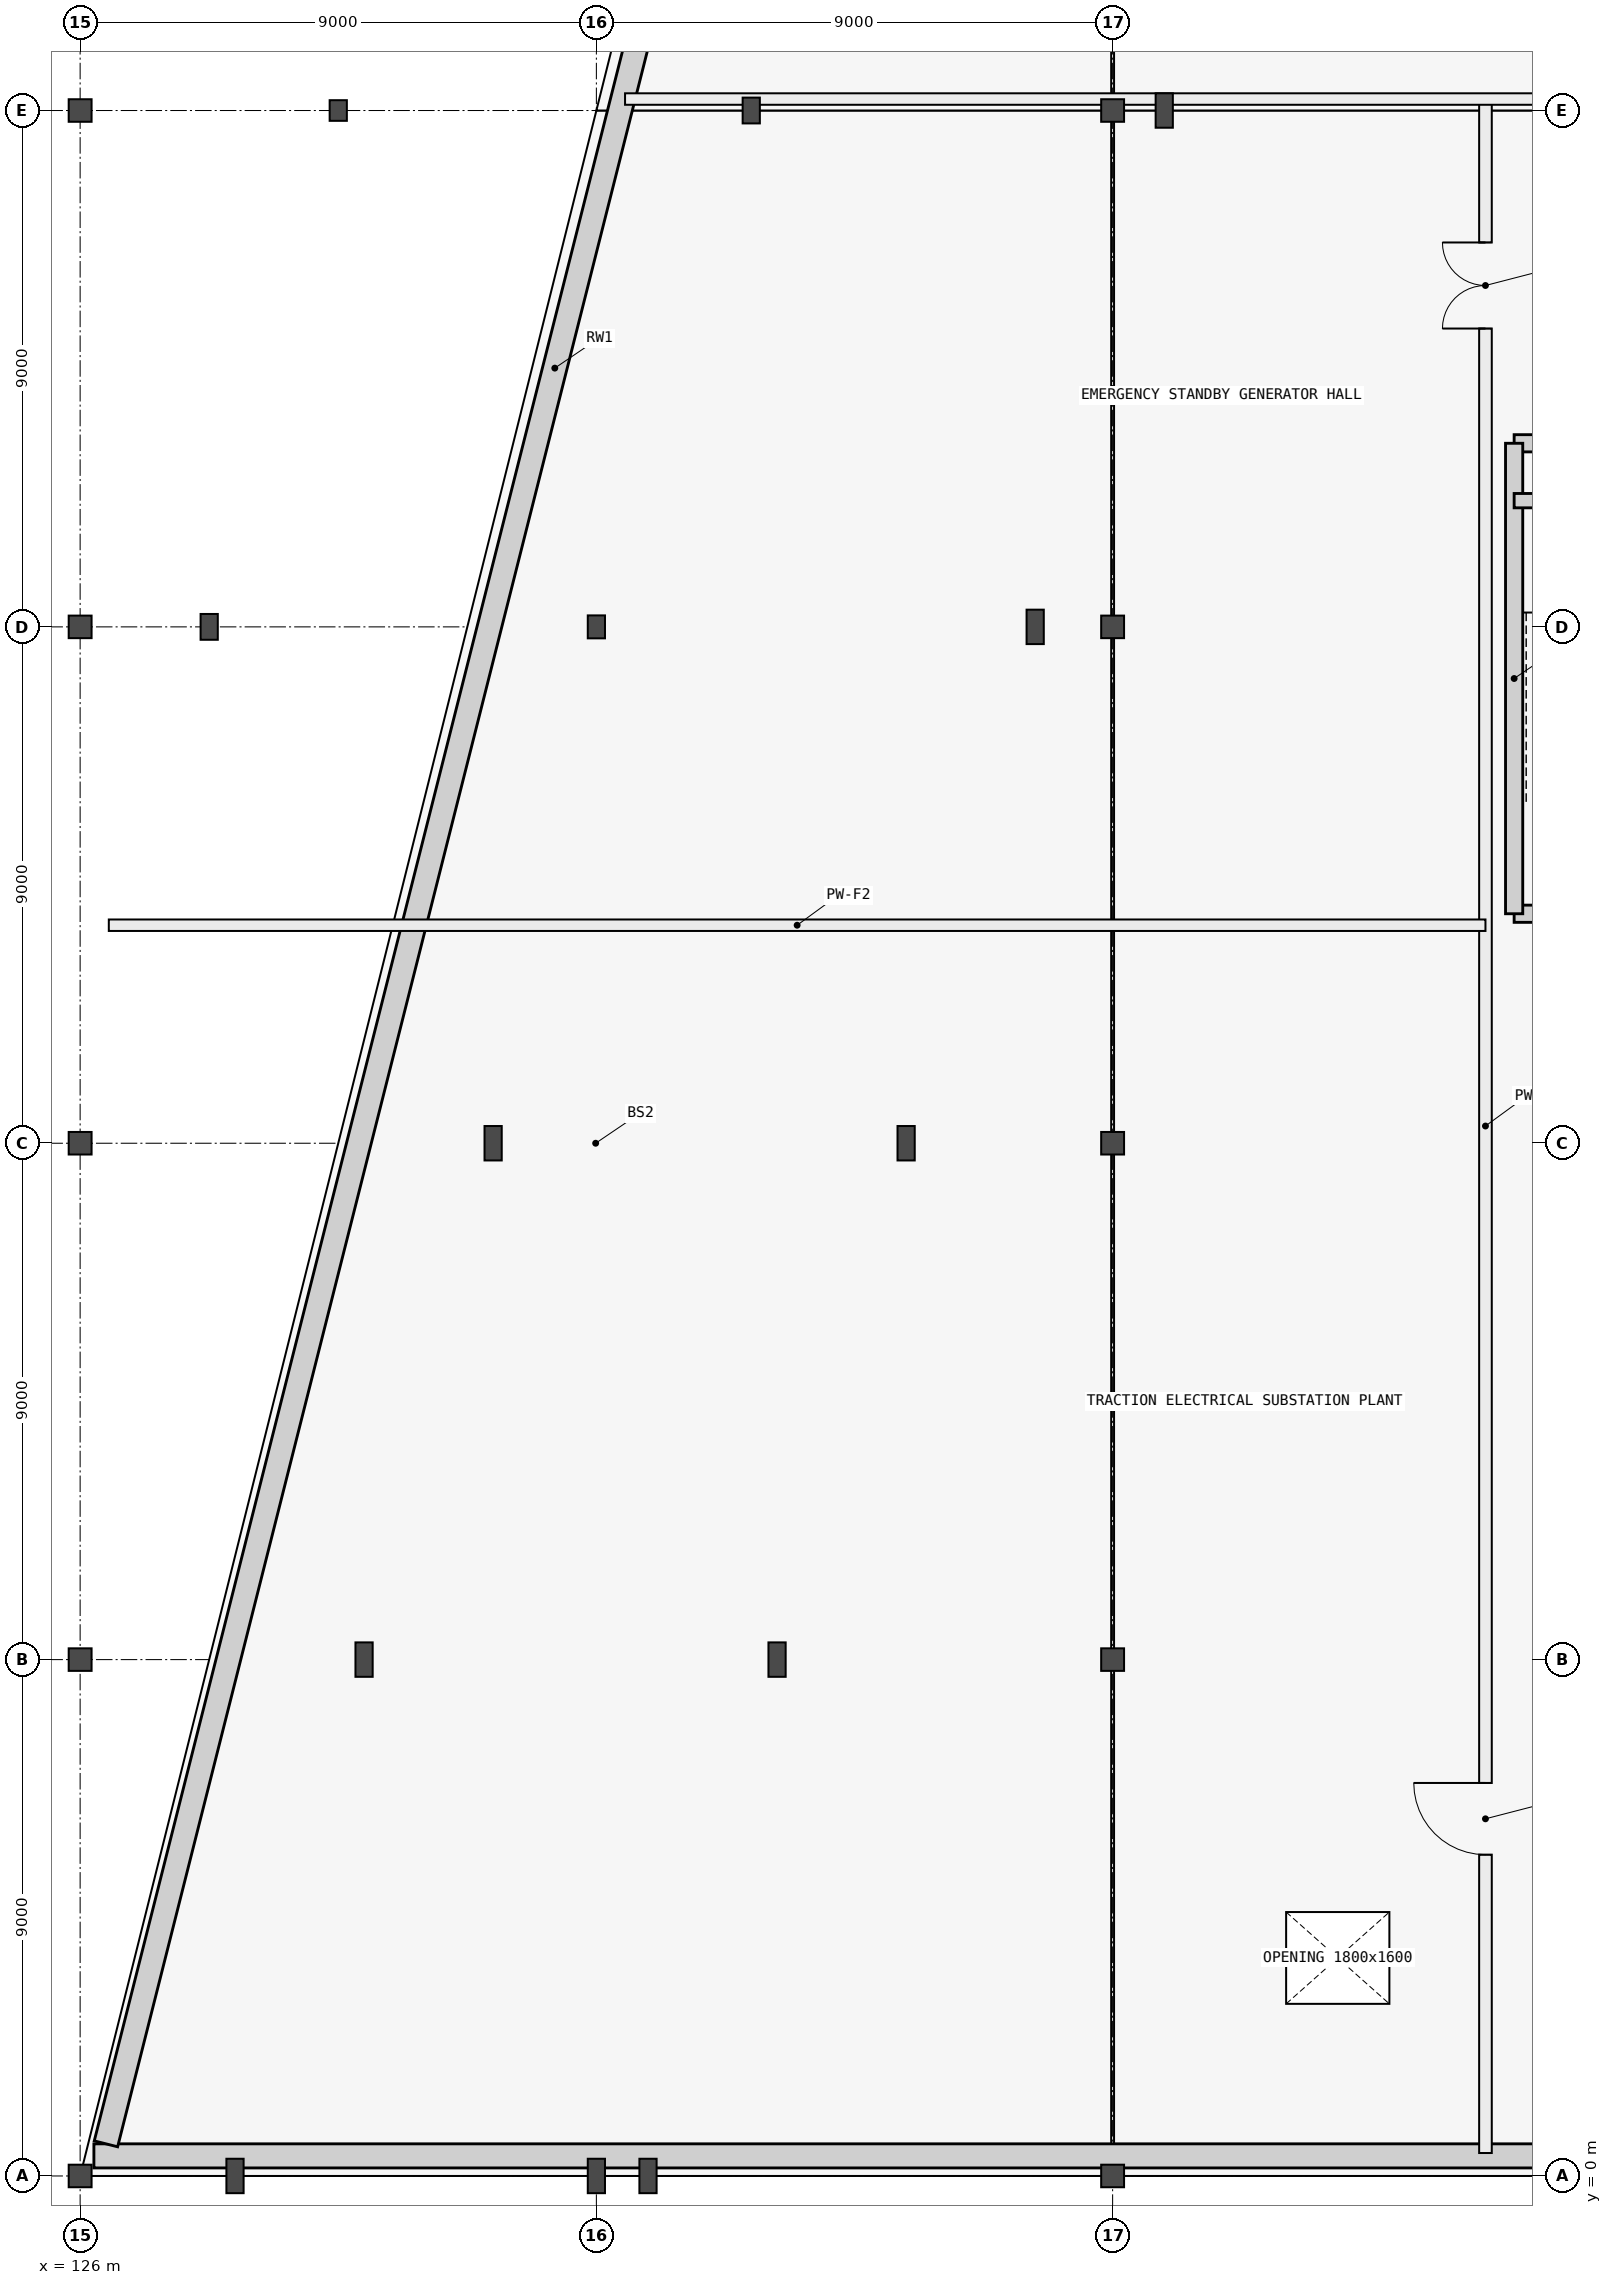
"""IFC4 building model, lengths in metres.
Left out: names, types, materials, properties, quantities, classifications, styles, units other than length and angle.
Written with IfcOpenShell. Run it as: python <this file> out.ifc"""

import sys

from ifc_helpers import new_model, si_unit, direction, frame, frame_2d, origin, origin_2d, place, context, subcontext, project, spatial, rectangle, i_section, extrude, element, fill, save


model = new_model("IFC4")
c1 = context("Model", 3, precision=1e-05, world=origin(), true_north=direction((0.0, 1.0)))
c2 = subcontext(c1, "Body", "Model", "MODEL_VIEW")
j1 = project(units=[si_unit("LENGTHUNIT", "METRE"), si_unit("PLANEANGLEUNIT", "RADIAN")], contexts=[c1])
p1 = place(None, origin())
s1 = spatial("IfcSite", under=j1, at=p1, CompositionType="ELEMENT")
p2 = place(p1, origin())
s2 = spatial("IfcBuilding", under=s1, at=p2, CompositionType="ELEMENT")
p3 = place(p2, frame((0.0, 0.0, -4.2)))
s3 = spatial("IfcBuildingStorey", under=s2, at=p3, CompositionType="ELEMENT", Elevation=-4.2)
p4 = place(p3, frame((126.0, 0.0, 0.0), z_axis=(0.0, 0.0, 1.0), x_axis=(1.0, 0.0, 0.0)))
e1 = element("IfcColumn", 1, at=p4, inside=s3, PredefinedType="COLUMN", context=c2, shape_type="SweptSolid", body=[
    extrude(i_section(OverallWidth=0.399, OverallDepth=0.393, WebThickness=0.018, FlangeThickness=0.028, FilletRadius=0.015, at=origin_2d()), origin(), (0.0, 0.0, 1.0), 4.2),
])
for number, where, z_axis, x_axis in (
    (2, (128.7, 0.0, 0.0), (0.0, 0.0, 1.0), (1.0, 0.0, 0.0)),
    (3, (135.0, 0.0, 0.0), (0.0, 0.0, 1.0), (1.0, 0.0, 0.0)),
    (4, (135.9, 0.0, 0.0), (0.0, 0.0, 1.0), (1.0, 0.0, 0.0)),
):
    element("IfcColumn", number, at=place(p3, frame(where, z_axis=z_axis, x_axis=x_axis)), inside=s3, PredefinedType="COLUMN", context=c2, shape_type="SweptSolid", body=[
        extrude(i_section(OverallWidth=0.3, OverallDepth=0.6, WebThickness=0.015, FlangeThickness=0.03, FilletRadius=0.027, at=origin_2d()), origin(), (0.0, 0.0, 1.0), 4.2),
    ])
for number, where, z_axis, x_axis in (
    (5, (144.0, 0.0, 0.0), (0.0, 0.0, 1.0), (1.0, 0.0, 0.0)),
    (6, (126.0, 9.0, 0.0), (0.0, 0.0, 1.0), (1.0, 0.0, 0.0)),
):
    element("IfcColumn", number, at=place(p3, frame(where, z_axis=z_axis, x_axis=x_axis)), inside=s3, PredefinedType="COLUMN", context=c2, shape_type="SweptSolid", body=[
        extrude(i_section(OverallWidth=0.399, OverallDepth=0.393, WebThickness=0.018, FlangeThickness=0.028, FilletRadius=0.015, at=origin_2d()), origin(), (0.0, 0.0, 1.0), 4.2),
    ])
for number, where, z_axis, x_axis in (
    (7, (130.95, 9.0, 0.0), (0.0, 0.0, 1.0), (1.0, 0.0, 0.0)),
    (8, (138.15, 9.0, 0.0), (0.0, 0.0, 1.0), (1.0, 0.0, 0.0)),
):
    element("IfcColumn", number, at=place(p3, frame(where, z_axis=z_axis, x_axis=x_axis)), inside=s3, PredefinedType="COLUMN", context=c2, shape_type="SweptSolid", body=[
        extrude(i_section(OverallWidth=0.3, OverallDepth=0.6, WebThickness=0.015, FlangeThickness=0.03, FilletRadius=0.027, at=origin_2d()), origin(), (0.0, 0.0, 1.0), 4.2),
    ])
for number, where, z_axis, x_axis in (
    (9, (144.0, 9.0, 0.0), (0.0, 0.0, 1.0), (1.0, 0.0, 0.0)),
    (10, (126.0, 18.0, 0.0), (0.0, 0.0, 1.0), (1.0, 0.0, 0.0)),
):
    element("IfcColumn", number, at=place(p3, frame(where, z_axis=z_axis, x_axis=x_axis)), inside=s3, PredefinedType="COLUMN", context=c2, shape_type="SweptSolid", body=[
        extrude(i_section(OverallWidth=0.399, OverallDepth=0.393, WebThickness=0.018, FlangeThickness=0.028, FilletRadius=0.015, at=origin_2d()), origin(), (0.0, 0.0, 1.0), 4.2),
    ])
for number, where, z_axis, x_axis in (
    (11, (133.2, 18.0, 0.0), (0.0, 0.0, 1.0), (1.0, 0.0, 0.0)),
    (12, (140.4, 18.0, 0.0), (0.0, 0.0, 1.0), (1.0, 0.0, 0.0)),
):
    element("IfcColumn", number, at=place(p3, frame(where, z_axis=z_axis, x_axis=x_axis)), inside=s3, PredefinedType="COLUMN", context=c2, shape_type="SweptSolid", body=[
        extrude(i_section(OverallWidth=0.3, OverallDepth=0.6, WebThickness=0.015, FlangeThickness=0.03, FilletRadius=0.027, at=origin_2d()), origin(), (0.0, 0.0, 1.0), 4.2),
    ])
for number, where, z_axis, x_axis in (
    (13, (144.0, 18.0, 0.0), (0.0, 0.0, 1.0), (1.0, 0.0, 0.0)),
    (14, (126.0, 27.0, 0.0), (0.0, 0.0, 1.0), (1.0, 0.0, 0.0)),
):
    element("IfcColumn", number, at=place(p3, frame(where, z_axis=z_axis, x_axis=x_axis)), inside=s3, PredefinedType="COLUMN", context=c2, shape_type="SweptSolid", body=[
        extrude(i_section(OverallWidth=0.399, OverallDepth=0.393, WebThickness=0.018, FlangeThickness=0.028, FilletRadius=0.015, at=origin_2d()), origin(), (0.0, 0.0, 1.0), 4.2),
    ])
p5 = place(p3, frame((128.25, 27.0, 0.0), z_axis=(0.0, 0.0, 1.0), x_axis=(1.0, 0.0, 0.0)))
e15 = element("IfcColumn", 15, at=p5, inside=s3, PredefinedType="COLUMN", context=c2, shape_type="SweptSolid", body=[
    extrude(i_section(OverallWidth=0.3, OverallDepth=0.45, WebThickness=0.014, FlangeThickness=0.026, FilletRadius=0.027, at=origin_2d()), origin(), (0.0, 0.0, 1.0), 4.2),
])
p6 = place(p3, frame((135.0, 27.0, 0.0), z_axis=(0.0, 0.0, 1.0), x_axis=(1.0, 0.0, 0.0)))
e16 = element("IfcColumn", 16, at=p6, inside=s3, PredefinedType="COLUMN", context=c2, shape_type="SweptSolid", body=[
    extrude(i_section(OverallWidth=0.3, OverallDepth=0.4, WebThickness=0.013, FlangeThickness=0.024, FilletRadius=0.027, at=origin_2d()), origin(), (0.0, 0.0, 1.0), 4.2),
])
p7 = place(p3, frame((142.65, 27.0, 0.0), z_axis=(0.0, 0.0, 1.0), x_axis=(1.0, 0.0, 0.0)))
e17 = element("IfcColumn", 17, at=p7, inside=s3, PredefinedType="COLUMN", context=c2, shape_type="SweptSolid", body=[
    extrude(i_section(OverallWidth=0.3, OverallDepth=0.6, WebThickness=0.015, FlangeThickness=0.03, FilletRadius=0.027, at=origin_2d()), origin(), (0.0, 0.0, 1.0), 4.2),
])
for number, where, z_axis, x_axis in (
    (18, (144.0, 27.0, 0.0), (0.0, 0.0, 1.0), (1.0, 0.0, 0.0)),
    (19, (126.0, 36.0, 0.0), (0.0, 0.0, 1.0), (1.0, 0.0, 0.0)),
):
    element("IfcColumn", number, at=place(p3, frame(where, z_axis=z_axis, x_axis=x_axis)), inside=s3, PredefinedType="COLUMN", context=c2, shape_type="SweptSolid", body=[
        extrude(i_section(OverallWidth=0.399, OverallDepth=0.393, WebThickness=0.018, FlangeThickness=0.028, FilletRadius=0.015, at=origin_2d()), origin(), (0.0, 0.0, 1.0), 4.2),
    ])
p8 = place(p3, frame((130.5, 36.0, 0.0), z_axis=(0.0, 0.0, 1.0), x_axis=(1.0, 0.0, 0.0)))
e20 = element("IfcColumn", 20, at=p8, inside=s3, PredefinedType="COLUMN", context=c2, shape_type="SweptSolid", body=[
    extrude(i_section(OverallWidth=0.3, OverallDepth=0.36, WebThickness=0.012, FlangeThickness=0.022, FilletRadius=0.027, at=origin_2d()), origin(), (0.0, 0.0, 1.0), 4.2),
])
p9 = place(p3, frame((137.7, 36.0, 0.0), z_axis=(0.0, 0.0, 1.0), x_axis=(1.0, 0.0, 0.0)))
e21 = element("IfcColumn", 21, at=p9, inside=s3, PredefinedType="COLUMN", context=c2, shape_type="SweptSolid", body=[
    extrude(i_section(OverallWidth=0.3, OverallDepth=0.45, WebThickness=0.014, FlangeThickness=0.026, FilletRadius=0.027, at=origin_2d()), origin(), (0.0, 0.0, 1.0), 4.2),
])
p10 = place(p3, frame((144.0, 36.0, 0.0), z_axis=(0.0, 0.0, 1.0), x_axis=(1.0, 0.0, 0.0)))
e22 = element("IfcColumn", 22, at=p10, inside=s3, PredefinedType="COLUMN", context=c2, shape_type="SweptSolid", body=[
    extrude(i_section(OverallWidth=0.399, OverallDepth=0.393, WebThickness=0.018, FlangeThickness=0.028, FilletRadius=0.015, at=origin_2d()), origin(), (0.0, 0.0, 1.0), 4.2),
])
p11 = place(p3, frame((144.9, 36.0, 0.0), z_axis=(0.0, 0.0, 1.0), x_axis=(1.0, 0.0, 0.0)))
e23 = element("IfcColumn", 23, at=p11, inside=s3, PredefinedType="COLUMN", context=c2, shape_type="SweptSolid", body=[
    extrude(i_section(OverallWidth=0.3, OverallDepth=0.6, WebThickness=0.015, FlangeThickness=0.03, FilletRadius=0.027, at=origin_2d()), origin(), (0.0, 0.0, 1.0), 4.2),
])
p12 = place(p3, frame((126.24, 0.35, 0.0), z_axis=(0.0, 0.0, 1.0), x_axis=(1.0, 0.0, 0.0)))
e24 = element("IfcWall", 24, at=p12, inside=s3, PredefinedType="USERDEFINED", context=c2, shape_type="SweptSolid", body=[
    extrude(rectangle(XDim=53.62, YDim=0.42, at=frame_2d((26.81, 0.0))), origin(), (0.0, 0.0, 1.0), 3.6),
])
p13 = place(p3, frame((126.45, 0.56, 0.0), z_axis=(0.0, 0.0, 1.0), x_axis=(0.245116954548, 0.96949351653, 0.0)))
e25 = element("IfcWall", 25, at=p13, inside=s3, PredefinedType="USERDEFINED", context=c2, shape_type="SweptSolid", body=[
    extrude(rectangle(XDim=63.848, YDim=0.42, at=frame_2d((31.924, 0.0))), origin(), (0.0, 0.0, 1.0), 3.6),
])
p14 = place(p3, frame((151.0, 22.0, 0.0), z_axis=(0.0, 0.0, 1.0), x_axis=(1.0, 0.0, 0.0)))
e26 = element("IfcWall", 26, at=p14, inside=s3, PredefinedType="SHEAR", context=c2, shape_type="SweptSolid", body=[
    extrude(rectangle(XDim=10.2, YDim=0.3, at=frame_2d((5.1, 0.0))), origin(), (0.0, 0.0, 1.0), 3.94),
])
p15 = place(p14, frame((4.75, 0.0, 0.0)))
e27 = element("IfcOpeningElement", 27, at=p15, cuts=e26, PredefinedType="OPENING", context=c2, shape_type="SweptSolid", body=[
    extrude(rectangle(XDim=1.2, YDim=2.15, at=frame_2d((0.6, 1.075))), frame((0.0, 0.16, 0.0), z_axis=(0.0, -1.0, 0.0), x_axis=(1.0, 0.0, 0.0)), (0.0, 0.0, 1.0), 0.32),
])
p16 = place(p3, frame((161.2, 30.2, 0.0), z_axis=(0.0, 0.0, 1.0), x_axis=(-1.0, 0.0, 0.0)))
e28 = element("IfcWall", 28, at=p16, inside=s3, PredefinedType="SHEAR", context=c2, shape_type="SweptSolid", body=[
    extrude(rectangle(XDim=10.2, YDim=0.3, at=frame_2d((5.1, 0.0))), origin(), (0.0, 0.0, 1.0), 3.94),
])
p17 = place(p3, frame((151.0, 30.2, 0.0), z_axis=(0.0, 0.0, 1.0), x_axis=(0.0, -1.0, 0.0)))
e29 = element("IfcWall", 29, at=p17, inside=s3, PredefinedType="SHEAR", context=c2, shape_type="SweptSolid", body=[
    extrude(rectangle(XDim=8.2, YDim=0.3, at=frame_2d((4.1, 0.0))), origin(), (0.0, 0.0, 1.0), 3.94),
])
p18 = place(p3, frame((151.0, 29.2, 0.0), z_axis=(0.0, 0.0, 1.0), x_axis=(1.0, 0.0, 0.0)))
e30 = element("IfcWall", 30, at=p18, inside=s3, PredefinedType="SHEAR", context=c2, shape_type="SweptSolid", body=[
    extrude(rectangle(XDim=4.36, YDim=0.25, at=frame_2d((2.18, 0.0))), origin(), (0.0, 0.0, 1.0), 3.94),
])
p19 = place(p3, frame((150.5, 0.4, 0.0), z_axis=(0.0, 0.0, 1.0), x_axis=(0.0, 1.0, 0.0)))
e31 = element("IfcWall", 31, at=p19, inside=s3, PredefinedType="PARTITIONING", context=c2, shape_type="SweptSolid", body=[
    extrude(rectangle(XDim=35.8, YDim=0.22, at=frame_2d((17.9, 0.0))), origin(), (0.0, 0.0, 1.0), 3.94),
])
p20 = place(p19, frame((5.2, 0.0, 0.0)))
e32 = element("IfcOpeningElement", 32, at=p20, cuts=e31, PredefinedType="OPENING", context=c2, shape_type="SweptSolid", body=[
    extrude(rectangle(XDim=1.25, YDim=2.2, at=frame_2d((0.625, 1.1))), frame((0.0, 0.12, 0.0), z_axis=(0.0, -1.0, 0.0), x_axis=(1.0, 0.0, 0.0)), (0.0, 0.0, 1.0), 0.24),
])
p21 = place(p19, frame((31.8, 0.0, 0.0)))
e33 = element("IfcOpeningElement", 33, at=p21, cuts=e31, PredefinedType="OPENING", context=c2, shape_type="SweptSolid", body=[
    extrude(rectangle(XDim=1.5, YDim=2.2, at=frame_2d((0.75, 1.1))), frame((0.0, 0.12, 0.0), z_axis=(0.0, -1.0, 0.0), x_axis=(1.0, 0.0, 0.0)), (0.0, 0.0, 1.0), 0.24),
])
p22 = place(p3, frame((126.5, 21.8, 0.0), z_axis=(0.0, 0.0, 1.0), x_axis=(1.0, 0.0, 0.0)))
e34 = element("IfcWall", 34, at=p22, inside=s3, PredefinedType="PARTITIONING", context=c2, shape_type="SweptSolid", body=[
    extrude(rectangle(XDim=24.0, YDim=0.2, at=frame_2d((12.0, 0.0))), origin(), (0.0, 0.0, 1.0), 3.94),
])
p23 = place(p3, frame((135.5, 36.2, 0.0), z_axis=(0.0, 0.0, 1.0), x_axis=(1.0, 0.0, 0.0)))
e35 = element("IfcWall", 35, at=p23, inside=s3, PredefinedType="PARTITIONING", context=c2, shape_type="SweptSolid", body=[
    extrude(rectangle(XDim=23.1, YDim=0.2, at=frame_2d((11.55, 0.0))), origin(), (0.0, 0.0, 1.0), 3.415),
])
p24 = place(p20, origin())
e36 = element("IfcDoor", 36, at=p24, inside=s3, OperationType="SINGLE_SWING_RIGHT", PredefinedType="DOOR", context=c2, shape_type="SweptSolid", body=[
    extrude(rectangle(XDim=1.25, YDim=2.2, at=frame_2d((0.625, 1.1))), frame((0.0, 0.025, 0.0), z_axis=(0.0, -1.0, 0.0), x_axis=(1.0, 0.0, 0.0)), (0.0, 0.0, 1.0), 0.05),
])
fill(e32, e36)
p25 = place(p21, origin())
e37 = element("IfcDoor", 37, at=p25, inside=s3, OperationType="DOUBLE_DOOR_SINGLE_SWING", PredefinedType="DOOR", context=c2, shape_type="SweptSolid", body=[
    extrude(rectangle(XDim=1.5, YDim=2.2, at=frame_2d((0.75, 1.1))), frame((0.0, 0.025, 0.0), z_axis=(0.0, -1.0, 0.0), x_axis=(1.0, 0.0, 0.0)), (0.0, 0.0, 1.0), 0.05),
])
fill(e33, e37)
save(model, sys.argv[1])
